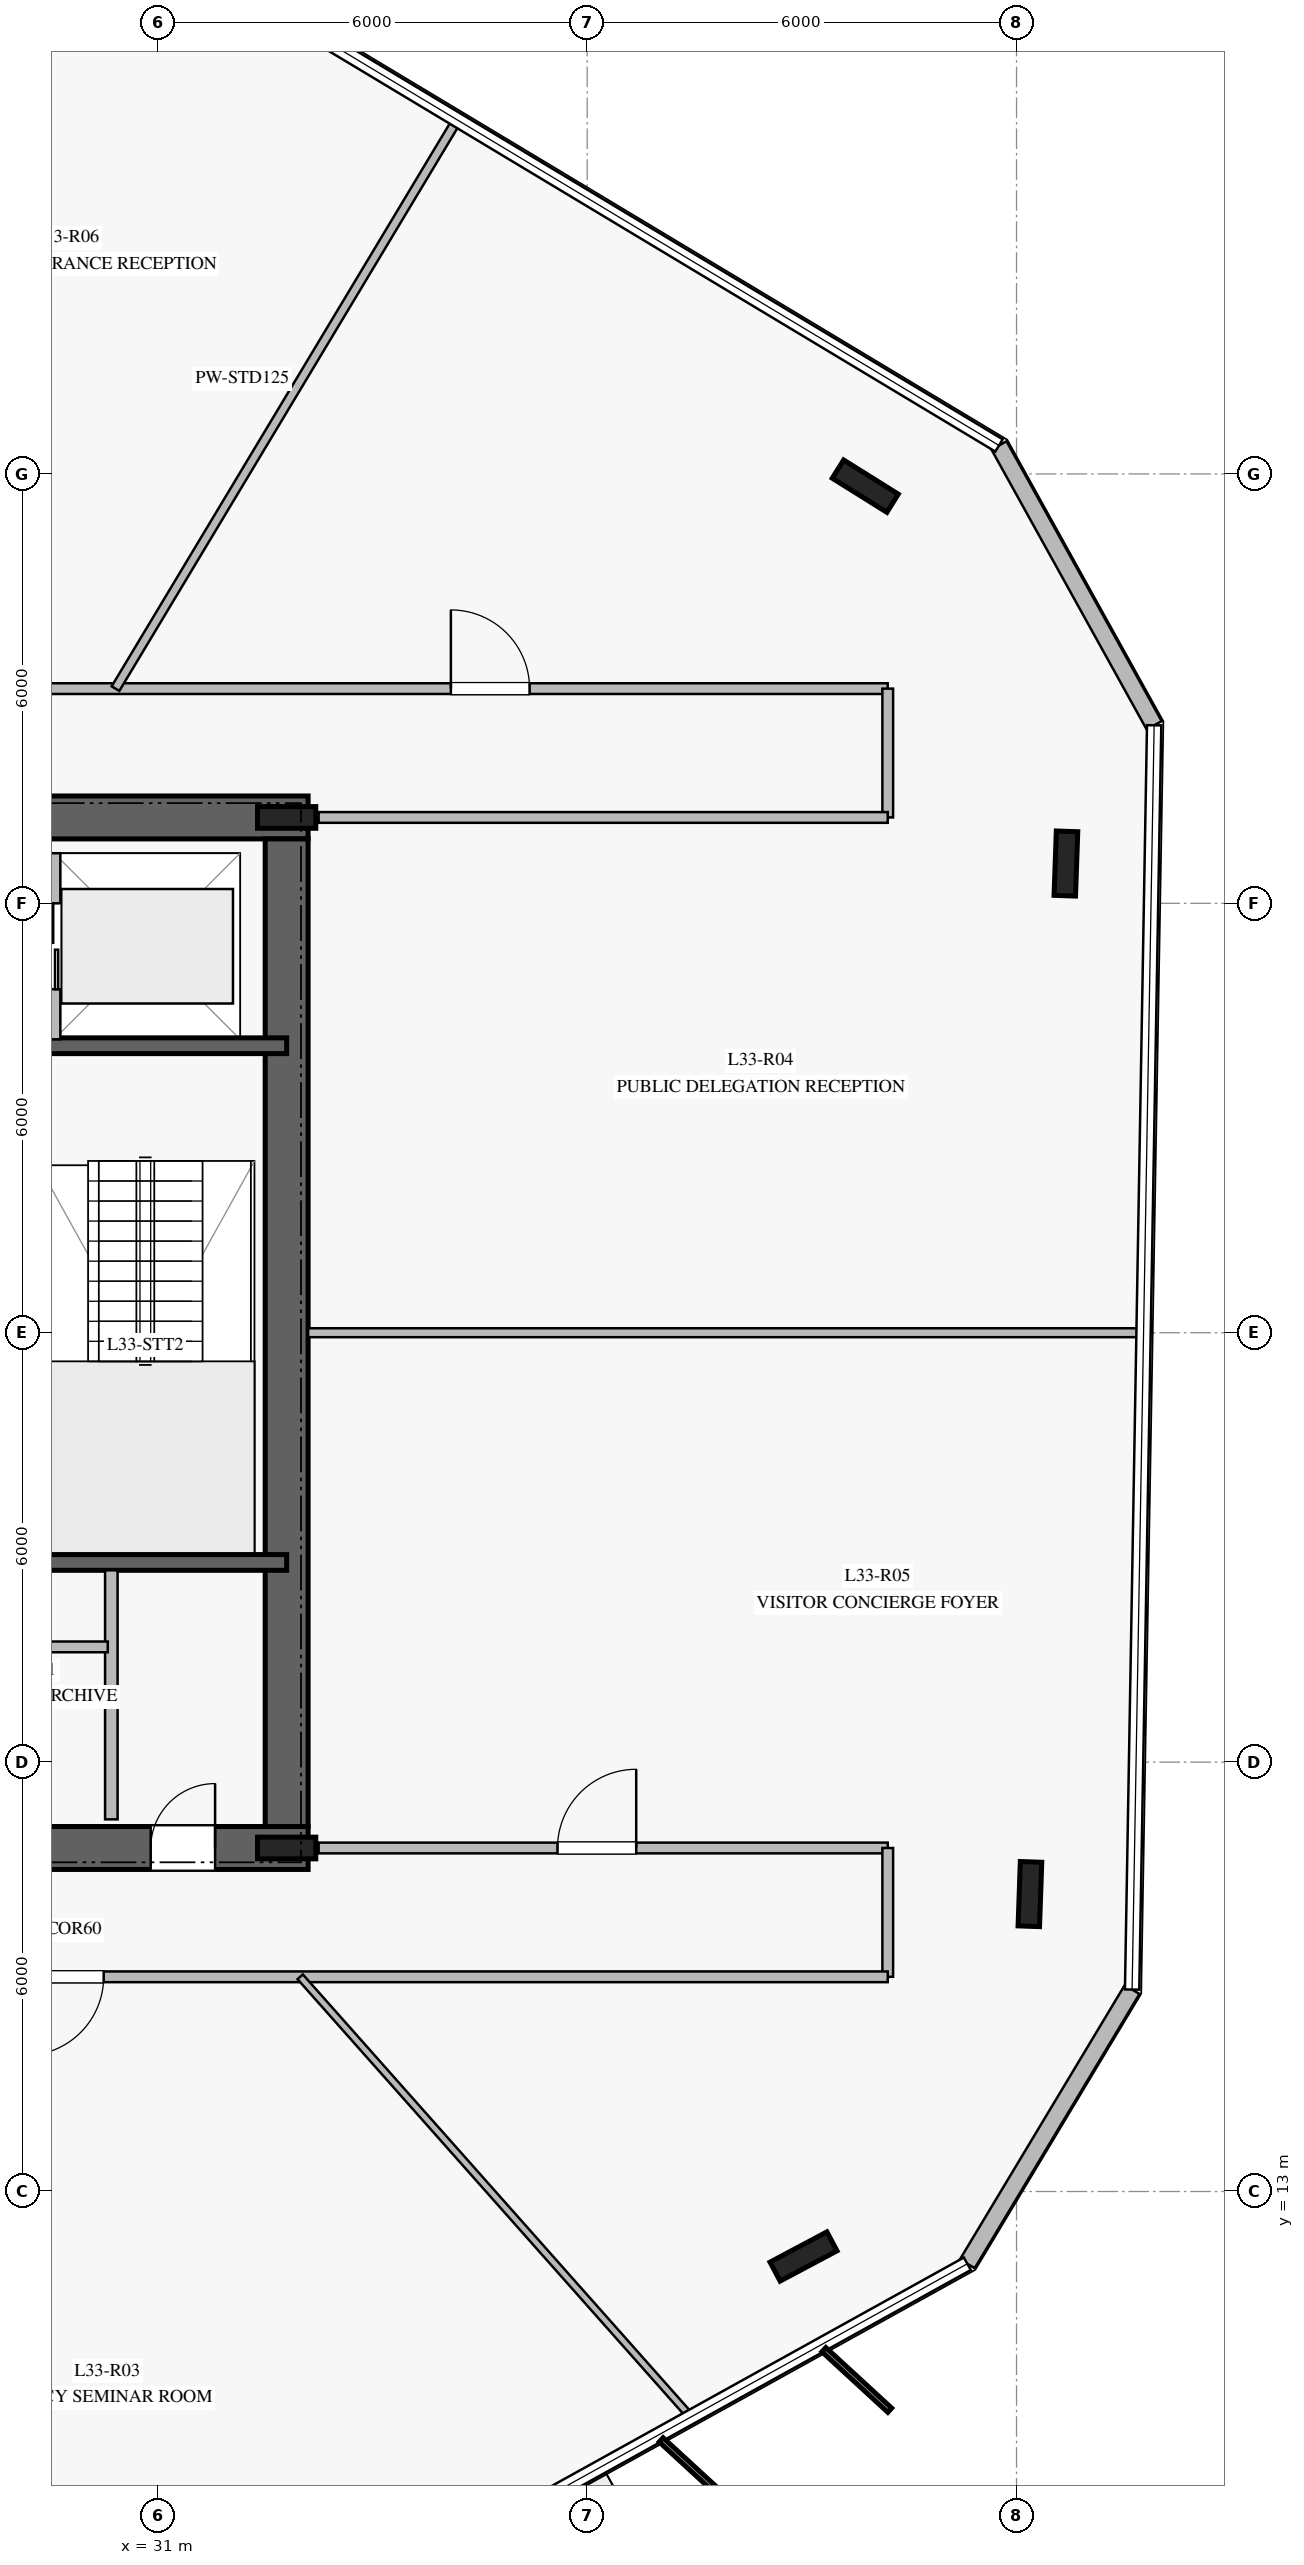
"""IFC4 building model, lengths in metres.
Left out: names, types, materials, properties, quantities, classifications, styles, units other than length and angle.
Written with IfcOpenShell. Run it as: python <this file> out.ifc"""

import sys

from ifc_helpers import new_model, si_unit, direction, frame, frame_2d, origin, origin_2d, place, context, subcontext, project, spatial, rectangle, i_section, extrude, element, fill, save


model = new_model("IFC4")
c1 = context("Model", 3, precision=1e-05, world=origin(), true_north=direction((0.0, 1.0)))
c2 = subcontext(c1, "Body", "Model", "MODEL_VIEW")
j1 = project(units=[si_unit("LENGTHUNIT", "METRE"), si_unit("PLANEANGLEUNIT", "RADIAN")], contexts=[c1])
p1 = place(None, origin())
s1 = spatial("IfcSite", under=j1, at=p1, CompositionType="ELEMENT")
p2 = place(p1, origin())
s2 = spatial("IfcBuilding", under=s1, at=p2, CompositionType="ELEMENT")
p3 = place(p2, frame((0.0, 0.0, 138.4)))
s3 = spatial("IfcBuildingStorey", under=s2, at=p3, CompositionType="ELEMENT", Elevation=138.4)
p4 = place(p3, frame((16.9, 17.8, 0.0), z_axis=(0.0, 0.0, 1.0), x_axis=(1.0, 0.0, 0.0)))
e1 = element("IfcWall", 1, at=p4, inside=s3, PredefinedType="SHEAR", context=c2, shape_type="SweptSolid", body=[
    extrude(rectangle(XDim=16.2, YDim=0.6, at=frame_2d((8.1, 0.0))), origin(), (0.0, 0.0, 1.0), 3.76),
])
p5 = place(p4, frame((5.05, 0.0, 0.0)))
e2 = element("IfcOpeningElement", 2, at=p5, cuts=e1, PredefinedType="OPENING", context=c2, shape_type="SweptSolid", body=[
    extrude(rectangle(XDim=1.2, YDim=2.25, at=frame_2d((0.6, 1.125))), frame((0.0, 0.31, 0.0), z_axis=(0.0, -1.0, 0.0), x_axis=(1.0, 0.0, 0.0)), (0.0, 0.0, 1.0), 0.62),
])
p6 = place(p4, frame((14.0, 0.0, 0.0)))
e3 = element("IfcOpeningElement", 3, at=p6, cuts=e1, PredefinedType="OPENING", context=c2, shape_type="SweptSolid", body=[
    extrude(rectangle(XDim=0.9, YDim=2.1, at=frame_2d((0.45, 1.05))), frame((0.0, 0.31, 0.0), z_axis=(0.0, -1.0, 0.0), x_axis=(1.0, 0.0, 0.0)), (0.0, 0.0, 1.0), 0.62),
])
p7 = place(p4, frame((9.875, 0.0, 0.0)))
e4 = element("IfcOpeningElement", 4, at=p7, cuts=e1, PredefinedType="OPENING", context=c2, shape_type="SweptSolid", body=[
    extrude(rectangle(XDim=1.1, YDim=2.2, at=frame_2d((0.55, 1.1))), frame((0.0, 0.31, 0.0), z_axis=(0.0, -1.0, 0.0), x_axis=(1.0, 0.0, 0.0)), (0.0, 0.0, 1.0), 0.62),
])
p8 = place(p3, frame((33.1, 32.2, 0.0), z_axis=(0.0, 0.0, 1.0), x_axis=(-1.0, 0.0, 0.0)))
e5 = element("IfcWall", 5, at=p8, inside=s3, PredefinedType="SHEAR", context=c2, shape_type="SweptSolid", body=[
    extrude(rectangle(XDim=16.2, YDim=0.6, at=frame_2d((8.1, 0.0))), origin(), (0.0, 0.0, 1.0), 3.76),
])
p9 = place(p8, frame((5.05, 0.0, 0.0)))
e6 = element("IfcOpeningElement", 6, at=p9, cuts=e5, PredefinedType="OPENING", context=c2, shape_type="SweptSolid", body=[
    extrude(rectangle(XDim=1.2, YDim=2.25, at=frame_2d((0.6, 1.125))), frame((0.0, 0.31, 0.0), z_axis=(0.0, -1.0, 0.0), x_axis=(1.0, 0.0, 0.0)), (0.0, 0.0, 1.0), 0.62),
])
p10 = place(p8, frame((11.85, 0.0, 0.0)))
e7 = element("IfcOpeningElement", 7, at=p10, cuts=e5, PredefinedType="OPENING", context=c2, shape_type="SweptSolid", body=[
    extrude(rectangle(XDim=1.1, YDim=2.2, at=frame_2d((0.55, 1.1))), frame((0.0, 0.31, 0.0), z_axis=(0.0, -1.0, 0.0), x_axis=(1.0, 0.0, 0.0)), (0.0, 0.0, 1.0), 0.62),
])
p11 = place(p8, frame((9.875, 0.0, 0.0)))
e8 = element("IfcOpeningElement", 8, at=p11, cuts=e5, PredefinedType="OPENING", context=c2, shape_type="SweptSolid", body=[
    extrude(rectangle(XDim=1.1, YDim=2.2, at=frame_2d((0.55, 1.1))), frame((0.0, 0.31, 0.0), z_axis=(0.0, -1.0, 0.0), x_axis=(1.0, 0.0, 0.0)), (0.0, 0.0, 1.0), 0.62),
])
p12 = place(p8, frame((7.9, 0.0, 0.0)))
e9 = element("IfcOpeningElement", 9, at=p12, cuts=e5, PredefinedType="OPENING", context=c2, shape_type="SweptSolid", body=[
    extrude(rectangle(XDim=1.1, YDim=2.2, at=frame_2d((0.55, 1.1))), frame((0.0, 0.31, 0.0), z_axis=(0.0, -1.0, 0.0), x_axis=(1.0, 0.0, 0.0)), (0.0, 0.0, 1.0), 0.62),
])
p13 = place(p3, frame((32.8, 18.1, 0.0), z_axis=(0.0, 0.0, 1.0), x_axis=(0.0, 1.0, 0.0)))
e10 = element("IfcWall", 10, at=p13, inside=s3, PredefinedType="SHEAR", context=c2, shape_type="SweptSolid", body=[
    extrude(rectangle(XDim=13.8, YDim=0.6, at=frame_2d((6.9, 0.0))), origin(), (0.0, 0.0, 1.0), 3.76),
])
for number, where, z_axis, x_axis in (
    (11, (32.8, 17.8, 0.0), (0.0, 0.0, 1.0), (1.0, 0.0, 0.0)),
    (12, (32.8, 32.2, 0.0), (0.0, 0.0, 1.0), (1.0, 0.0, 0.0)),
):
    element("IfcColumn", number, at=place(p3, frame(where, z_axis=z_axis, x_axis=x_axis)), inside=s3, PredefinedType="COLUMN", context=c2, shape_type="SweptSolid", body=[
        extrude(i_section(OverallWidth=0.303, OverallDepth=0.814, WebThickness=0.021, FlangeThickness=0.04, at=origin_2d()), origin(), (0.0, 0.0, 1.0), 4.0),
    ])
for number, where, z_axis, x_axis in (
    (13, (29.08, 21.79, 0.0), (0.0, 0.0, 1.0), (1.0, 0.0, 0.0)),
    (14, (29.08, 29.01, 0.0), (0.0, 0.0, 1.0), (1.0, 0.0, 0.0)),
):
    element("IfcWall", number, at=place(p3, frame(where, z_axis=z_axis, x_axis=x_axis)), inside=s3, PredefinedType="SOLIDWALL", context=c2, shape_type="SweptSolid", body=[
        extrude(rectangle(XDim=3.72, YDim=0.22, at=frame_2d((1.86, 0.0))), origin(), (0.0, 0.0, 1.0), 3.76),
    ])
for number, where, z_axis, x_axis in (
    (15, (40.886, 36.829, 0.0), (0.0, 0.0, 1.0), (-0.848, 0.53, 0.0)),
    (16, (40.023, 12.092, 0.0), (0.0, 0.0, 1.0), (0.883, 0.469, 0.0)),
    (17, (43.187, 17.156, 0.0), (0.0, 0.0, 1.0), (0.035, 0.999, 0.0)),
    (18, (43.69, 31.556, 0.0), (0.0, 0.0, 1.0), (0.035, 0.999, 0.0)),
):
    element("IfcColumn", number, at=place(p3, frame(where, z_axis=z_axis, x_axis=x_axis)), inside=s3, PredefinedType="COLUMN", context=c2, shape_type="SweptSolid", body=[
        extrude(i_section(OverallWidth=0.3, OverallDepth=0.9, WebThickness=0.019, FlangeThickness=0.035, at=origin_2d()), origin(), (0.0, 0.0, 1.0), 4.0),
    ])
p14 = place(p3, frame((42.312, 11.99, 0.0), z_axis=(0.0, 0.0, 1.0), x_axis=(0.515113973, 0.857121691955, 0.0)))
e19 = element("IfcWall", 19, at=p14, inside=s3, PredefinedType="STANDARD", context=c2, shape_type="SweptSolid", body=[
    extrude(rectangle(XDim=4.471, YDim=0.24, at=frame_2d((2.235, 0.0))), origin(), (0.0, 0.0, 1.0), 3.76),
])
p15 = place(p3, frame((44.923, 33.488, 0.0), z_axis=(0.0, 0.0, 1.0), x_axis=(-0.484965863304, 0.874533081953, 0.0)))
e20 = element("IfcWall", 20, at=p15, inside=s3, PredefinedType="STANDARD", context=c2, shape_type="SweptSolid", body=[
    extrude(rectangle(XDim=4.471, YDim=0.24, at=frame_2d((2.235, 0.0))), origin(), (0.0, 0.0, 1.0), 3.76),
])
p16 = place(p3, frame((30.35, 18.2, 0.0), z_axis=(0.0, 0.0, 1.0), x_axis=(0.0, 1.0, 0.0)))
e21 = element("IfcWall", 21, at=p16, inside=s3, PredefinedType="PARTITIONING", context=c2, shape_type="SweptSolid", body=[
    extrude(rectangle(XDim=3.48, YDim=0.175, at=frame_2d((1.74, 0.0))), origin(), (0.0, 0.0, 1.0), 3.76),
])
p17 = place(p3, frame((24.4, 20.61, 0.0), z_axis=(0.0, 0.0, 1.0), x_axis=(1.0, 0.0, 0.0)))
e22 = element("IfcWall", 22, at=p17, inside=s3, PredefinedType="PARTITIONING", context=c2, shape_type="SweptSolid", body=[
    extrude(rectangle(XDim=5.9, YDim=0.15, at=frame_2d((2.95, 0.0))), origin(), (0.0, 0.0, 1.0), 3.76),
])
p18 = place(p3, frame((29.55, 29.1, 0.0), z_axis=(0.0, 0.0, 1.0), x_axis=(0.0, 1.0, 0.0)))
e23 = element("IfcWall", 23, at=p18, inside=s3, PredefinedType="PARTITIONING", context=c2, shape_type="SweptSolid", body=[
    extrude(rectangle(XDim=2.6, YDim=0.175, at=frame_2d((1.3, 0.0))), origin(), (0.0, 0.0, 1.0), 3.76),
])
p19 = place(p18, frame((0.7, 0.0, 0.0)))
e24 = element("IfcOpeningElement", 24, at=p19, cuts=e23, PredefinedType="OPENING", context=c2, shape_type="SweptSolid", body=[
    extrude(rectangle(XDim=1.2, YDim=2.2, at=frame_2d((0.6, 1.1))), frame((0.0, 0.098, 0.0), z_axis=(0.0, -1.0, 0.0), x_axis=(1.0, 0.0, 0.0)), (0.0, 0.0, 1.0), 0.195),
])
p20 = place(p3, frame((25.95, 34.0, 0.0), z_axis=(0.0, 0.0, 1.0), x_axis=(1.0, 0.0, 0.0)))
e25 = element("IfcWall", 25, at=p20, inside=s3, PredefinedType="PARTITIONING", context=c2, shape_type="SweptSolid", body=[
    extrude(rectangle(XDim=15.25, YDim=0.15, at=frame_2d((7.625, 0.0))), origin(), (0.0, 0.0, 1.0), 3.21),
])
p21 = place(p20, frame((9.145, 0.0, 0.0)))
e26 = element("IfcOpeningElement", 26, at=p21, cuts=e25, PredefinedType="OPENING", context=c2, shape_type="SweptSolid", body=[
    extrude(rectangle(XDim=1.1, YDim=2.2, at=frame_2d((0.55, 1.1))), frame((0.0, 0.085, 0.0), z_axis=(0.0, -1.0, 0.0), x_axis=(1.0, 0.0, 0.0)), (0.0, 0.0, 1.0), 0.17),
])
p22 = place(p3, frame((41.2, 34.0, 0.0), z_axis=(0.0, 0.0, 1.0), x_axis=(0.0, -1.0, 0.0)))
e27 = element("IfcWall", 27, at=p22, inside=s3, PredefinedType="PARTITIONING", context=c2, shape_type="SweptSolid", body=[
    extrude(rectangle(XDim=1.8, YDim=0.15, at=frame_2d((0.9, 0.0))), origin(), (0.0, 0.0, 1.0), 3.76),
])
p23 = place(p3, frame((41.2, 32.2, 0.0), z_axis=(0.0, 0.0, 1.0), x_axis=(-1.0, 0.0, 0.0)))
e28 = element("IfcWall", 28, at=p23, inside=s3, PredefinedType="PARTITIONING", context=c2, shape_type="SweptSolid", body=[
    extrude(rectangle(XDim=7.953, YDim=0.15, at=frame_2d((3.977, 0.0))), origin(), (0.0, 0.0, 1.0), 3.21),
])
p24 = place(p3, frame((33.247, 17.8, 0.0), z_axis=(0.0, 0.0, 1.0), x_axis=(1.0, 0.0, 0.0)))
e29 = element("IfcWall", 29, at=p24, inside=s3, PredefinedType="PARTITIONING", context=c2, shape_type="SweptSolid", body=[
    extrude(rectangle(XDim=7.953, YDim=0.15, at=frame_2d((3.977, 0.0))), origin(), (0.0, 0.0, 1.0), 3.21),
])
p25 = place(p24, frame((3.338, 0.0, 0.0)))
e30 = element("IfcOpeningElement", 30, at=p25, cuts=e29, PredefinedType="OPENING", context=c2, shape_type="SweptSolid", body=[
    extrude(rectangle(XDim=1.1, YDim=2.2, at=frame_2d((0.55, 1.1))), frame((0.0, 0.085, 0.0), z_axis=(0.0, -1.0, 0.0), x_axis=(1.0, 0.0, 0.0)), (0.0, 0.0, 1.0), 0.17),
])
p26 = place(p3, frame((41.2, 17.8, 0.0), z_axis=(0.0, 0.0, 1.0), x_axis=(0.0, -1.0, 0.0)))
e31 = element("IfcWall", 31, at=p26, inside=s3, PredefinedType="PARTITIONING", context=c2, shape_type="SweptSolid", body=[
    extrude(rectangle(XDim=1.8, YDim=0.15, at=frame_2d((0.9, 0.0))), origin(), (0.0, 0.0, 1.0), 3.21),
])
p27 = place(p3, frame((41.2, 16.0, 0.0), z_axis=(0.0, 0.0, 1.0), x_axis=(-1.0, 0.0, 0.0)))
e32 = element("IfcWall", 32, at=p27, inside=s3, PredefinedType="PARTITIONING", context=c2, shape_type="SweptSolid", body=[
    extrude(rectangle(XDim=15.25, YDim=0.15, at=frame_2d((7.625, 0.0))), origin(), (0.0, 0.0, 1.0), 3.21),
])
p28 = place(p27, frame((10.957, 0.0, 0.0)))
e33 = element("IfcOpeningElement", 33, at=p28, cuts=e32, PredefinedType="OPENING", context=c2, shape_type="SweptSolid", body=[
    extrude(rectangle(XDim=1.1, YDim=2.2, at=frame_2d((0.55, 1.1))), frame((0.0, 0.085, 0.0), z_axis=(0.0, -1.0, 0.0), x_axis=(1.0, 0.0, 0.0)), (0.0, 0.0, 1.0), 0.17),
])
p29 = place(p3, frame((30.408, 34.0, 0.0), z_axis=(0.0, 0.0, 1.0), x_axis=(0.514992235675, 0.857194842025, 0.0)))
e34 = element("IfcWall", 34, at=p29, inside=s3, PredefinedType="PARTITIONING", context=c2, shape_type="SweptSolid", body=[
    extrude(rectangle(XDim=9.255, YDim=0.125, at=frame_2d((4.627, 0.0))), origin(), (0.0, 0.0, 1.0), 3.05),
])
p30 = place(p3, frame((32.989, 16.0, 0.0), z_axis=(0.0, 0.0, 1.0), x_axis=(0.663822664729, -0.747890011828, 0.0)))
e35 = element("IfcWall", 35, at=p30, inside=s3, PredefinedType="MOVABLE", context=c2, shape_type="SweptSolid", body=[
    extrude(rectangle(XDim=8.207, YDim=0.1, at=frame_2d((4.104, 0.0))), origin(), (0.0, 0.0, 1.0), 3.02),
])
p31 = place(p3, frame((33.1, 25.0, 0.0), z_axis=(0.0, 0.0, 1.0), x_axis=(1.0, 0.0, 0.0)))
e36 = element("IfcWall", 36, at=p31, inside=s3, PredefinedType="PARTITIONING", context=c2, shape_type="SweptSolid", body=[
    extrude(rectangle(XDim=11.658, YDim=0.125, at=frame_2d((5.829, 0.0))), origin(), (0.0, 0.0, 1.0), 3.16),
])
p32 = place(p6, origin())
e37 = element("IfcDoor", 37, at=p32, inside=s3, OperationType="SINGLE_SWING_RIGHT", PredefinedType="DOOR", context=c2, shape_type="SweptSolid", body=[
    extrude(rectangle(XDim=0.9, YDim=2.1, at=frame_2d((0.45, 1.05))), frame((0.0, 0.025, 0.0), z_axis=(0.0, -1.0, 0.0), x_axis=(1.0, 0.0, 0.0)), (0.0, 0.0, 1.0), 0.05),
])
fill(e3, e37)
p33 = place(p19, origin())
e38 = element("IfcDoor", 38, at=p33, inside=s3, OperationType="DOUBLE_DOOR_SLIDING", PredefinedType="DOOR", context=c2, shape_type="SweptSolid", body=[
    extrude(rectangle(XDim=1.2, YDim=2.2, at=frame_2d((0.6, 1.1))), frame((0.0, 0.025, 0.0), z_axis=(0.0, -1.0, 0.0), x_axis=(1.0, 0.0, 0.0)), (0.0, 0.0, 1.0), 0.05),
])
fill(e24, e38)
p34 = place(p28, origin())
e39 = element("IfcDoor", 39, at=p34, inside=s3, OperationType="SINGLE_SWING_RIGHT", PredefinedType="DOOR", context=c2, shape_type="SweptSolid", body=[
    extrude(rectangle(XDim=1.1, YDim=2.2, at=frame_2d((0.55, 1.1))), frame((0.0, 0.025, 0.0), z_axis=(0.0, -1.0, 0.0), x_axis=(1.0, 0.0, 0.0)), (0.0, 0.0, 1.0), 0.05),
])
fill(e33, e39)
p35 = place(p21, origin())
e40 = element("IfcDoor", 40, at=p35, inside=s3, OperationType="SINGLE_SWING_LEFT", PredefinedType="DOOR", context=c2, shape_type="SweptSolid", body=[
    extrude(rectangle(XDim=1.1, YDim=2.2, at=frame_2d((0.55, 1.1))), frame((0.0, 0.025, 0.0), z_axis=(0.0, -1.0, 0.0), x_axis=(1.0, 0.0, 0.0)), (0.0, 0.0, 1.0), 0.05),
])
fill(e26, e40)
p36 = place(p25, origin())
e41 = element("IfcDoor", 41, at=p36, inside=s3, OperationType="SINGLE_SWING_RIGHT", PredefinedType="DOOR", context=c2, shape_type="SweptSolid", body=[
    extrude(rectangle(XDim=1.1, YDim=2.2, at=frame_2d((0.55, 1.1))), frame((0.0, 0.025, 0.0), z_axis=(0.0, -1.0, 0.0), x_axis=(1.0, 0.0, 0.0)), (0.0, 0.0, 1.0), 0.05),
])
fill(e30, e41)
save(model, sys.argv[1])
